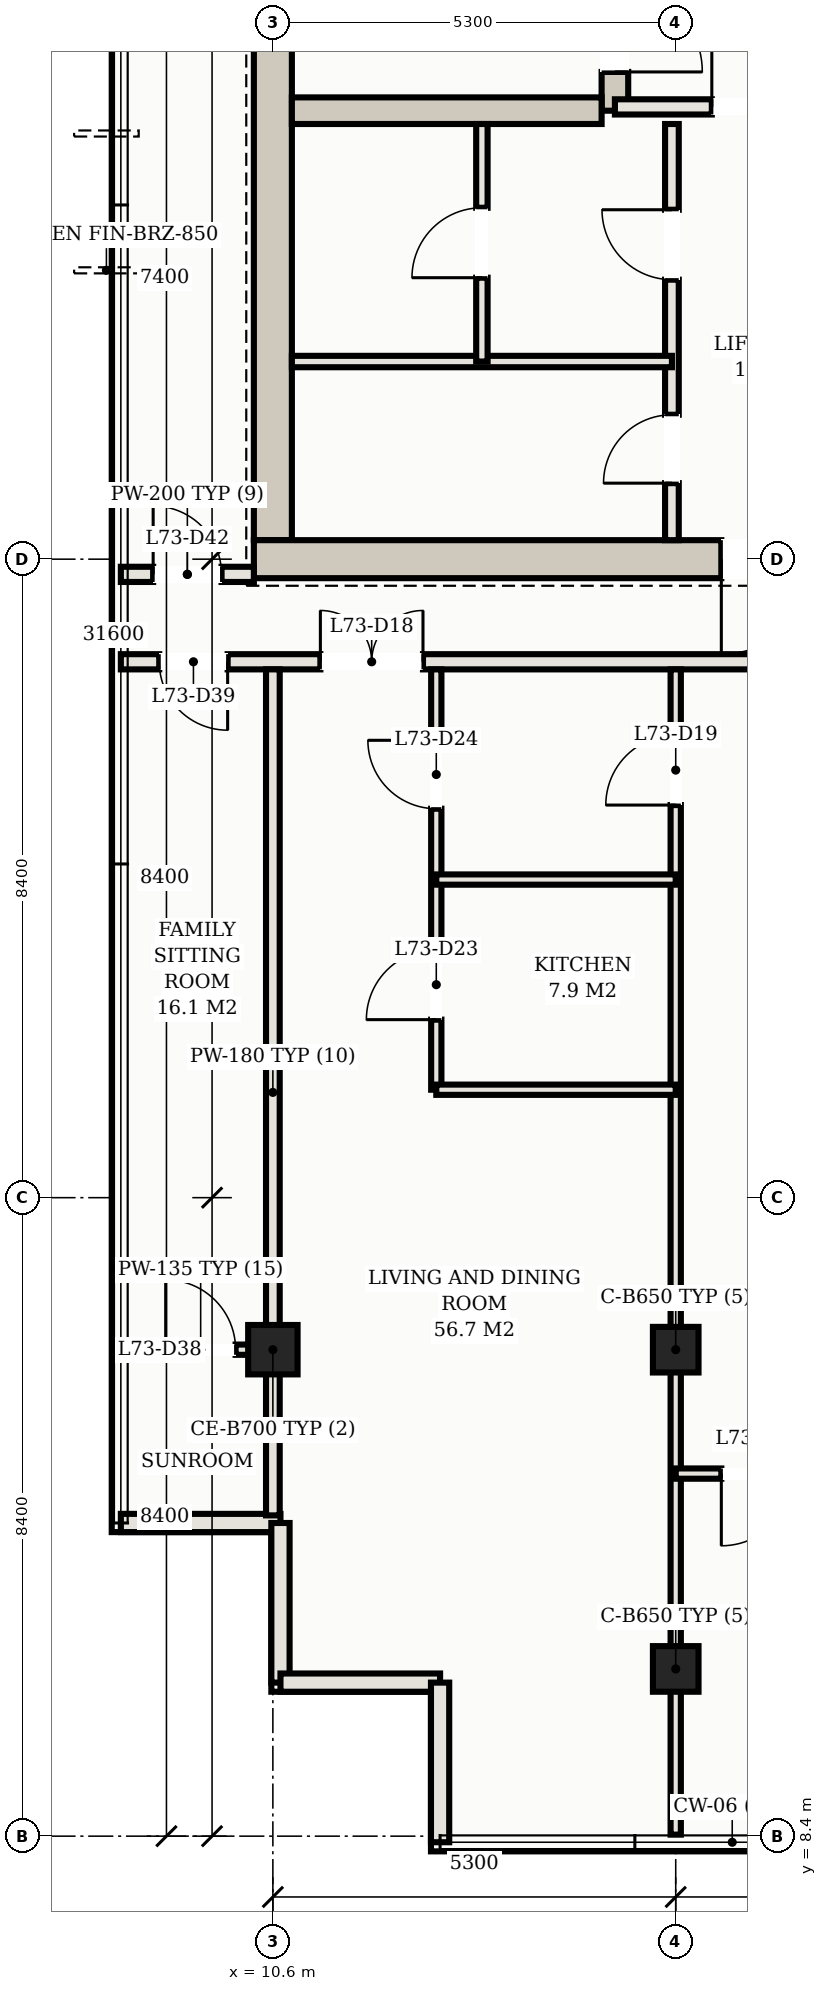
"""IFC4 building model, lengths in metres.
Left out: names, types, materials, properties, quantities, classifications, styles, units other than length and angle.
Written with IfcOpenShell. Run it as: python <this file> out.ifc"""

import sys

from ifc_helpers import new_model, si_unit, direction, frame, frame_2d, origin, origin_2d, place, context, subcontext, project, spatial, rectangle, hollow_rectangle, extrude, element, fill, save


model = new_model("IFC4")
c1 = context("Model", 3, precision=1e-05, world=origin(), true_north=direction((0.0, 1.0)))
c2 = subcontext(c1, "Body", "Model", "MODEL_VIEW")
j1 = project(units=[si_unit("LENGTHUNIT", "METRE"), si_unit("PLANEANGLEUNIT", "RADIAN")], contexts=[c1])
p1 = place(None, origin())
s1 = spatial("IfcSite", under=j1, at=p1, CompositionType="ELEMENT")
p2 = place(p1, origin())
s2 = spatial("IfcBuilding", under=s1, at=p2, CompositionType="ELEMENT")
p3 = place(p2, frame((0.0, 0.0, 262.7)))
s3 = spatial("IfcBuildingStorey", under=s2, at=p3, CompositionType="ELEMENT", Elevation=262.7)
p4 = place(p3, frame((10.6, 25.45, 0.0), z_axis=(0.0, 0.0, 1.0), x_axis=(0.0, 1.0, 0.0)))
e1 = element("IfcWall", 1, at=p4, inside=s3, PredefinedType="SHEAR", context=c2, shape_type="SweptSolid", body=[
    extrude(rectangle(XDim=14.3, YDim=0.5, at=frame_2d((7.15, 0.0))), origin(), (0.0, 0.0, 1.0), 3.04),
])
p5 = place(p3, frame((10.35, 25.2, 0.0), z_axis=(0.0, 0.0, 1.0), x_axis=(1.0, 0.0, 0.0)))
e2 = element("IfcWall", 2, at=p5, inside=s3, PredefinedType="SHEAR", context=c2, shape_type="SweptSolid", body=[
    extrude(rectangle(XDim=8.05, YDim=0.5, at=frame_2d((4.025, 0.0))), origin(), (0.0, 0.0, 1.0), 3.04),
])
p6 = place(p5, frame((6.15, 0.0, 0.0)))
e3 = element("IfcOpeningElement", 3, at=p6, cuts=e2, PredefinedType="OPENING", context=c2, shape_type="SweptSolid", body=[
    extrude(rectangle(XDim=1.25, YDim=2.2, at=frame_2d((0.625, 1.1))), frame((0.0, 0.26, 0.0), z_axis=(0.0, -1.0, 0.0), x_axis=(1.0, 0.0, 0.0)), (0.0, 0.0, 1.0), 0.52),
])
p7 = place(p3, frame((15.1, 31.1, 0.0), z_axis=(0.0, 0.0, 1.0), x_axis=(0.0, 1.0, 0.0)))
e4 = element("IfcWall", 4, at=p7, inside=s3, PredefinedType="SHEAR", context=c2, shape_type="SweptSolid", body=[
    extrude(rectangle(XDim=8.65, YDim=0.35, at=frame_2d((4.325, 0.0))), origin(), (0.0, 0.0, 1.0), 3.04),
])
p8 = place(p7, frame((0.51, 0.0, 0.0)))
e5 = element("IfcOpeningElement", 5, at=p8, cuts=e4, PredefinedType="OPENING", context=c2, shape_type="SweptSolid", body=[
    extrude(rectangle(XDim=1.15, YDim=2.2, at=frame_2d((0.575, 1.1))), frame((0.0, 0.185, 0.0), z_axis=(0.0, -1.0, 0.0), x_axis=(1.0, 0.0, 0.0)), (0.0, 0.0, 1.0), 0.37),
])
p9 = place(p3, frame((10.85, 31.1, 0.0), z_axis=(0.0, 0.0, 1.0), x_axis=(1.0, 0.0, 0.0)))
e6 = element("IfcWall", 6, at=p9, inside=s3, PredefinedType="SHEAR", context=c2, shape_type="SweptSolid", body=[
    extrude(rectangle(XDim=4.075, YDim=0.35, at=frame_2d((2.038, 0.0))), origin(), (0.0, 0.0, 1.0), 3.04),
])
p10 = place(p3, frame((15.9, 14.8, 0.0), z_axis=(0.0, 0.0, 1.0), x_axis=(1.0, 0.0, 0.0)))
e7 = element("IfcColumn", 7, at=p10, inside=s3, PredefinedType="COLUMN", context=c2, shape_type="SweptSolid", body=[
    extrude(hollow_rectangle(XDim=0.6, YDim=0.6, WallThickness=0.022, at=origin_2d()), origin(), (0.0, 0.0, 1.0), 3.3),
])
p11 = place(p3, frame((15.9, 10.6, 0.0), z_axis=(0.0, 0.0, 1.0), x_axis=(1.0, 0.0, 0.0)))
e8 = element("IfcColumn", 8, at=p11, inside=s3, PredefinedType="COLUMN", context=c2, shape_type="SweptSolid", body=[
    extrude(hollow_rectangle(XDim=0.6, YDim=0.6, WallThickness=0.022, at=origin_2d()), origin(), (0.0, 0.0, 1.0), 3.264),
])
p12 = place(p3, frame((10.6, 14.8, 0.0), z_axis=(0.0, 0.0, 1.0), x_axis=(1.0, 0.0, 0.0)))
e9 = element("IfcColumn", 9, at=p12, inside=s3, PredefinedType="COLUMN", context=c2, shape_type="SweptSolid", body=[
    extrude(hollow_rectangle(XDim=0.65, YDim=0.65, WallThickness=0.022, at=origin_2d()), origin(), (0.0, 0.0, 1.0), 3.3),
])
p13 = place(p3, frame((8.6, 12.52, 0.0), z_axis=(0.0, 0.0, 1.0), x_axis=(1.0, 0.0, 0.0)))
e10 = element("IfcWall", 10, at=p13, inside=s3, PredefinedType="SOLIDWALL", context=c2, shape_type="SweptSolid", body=[
    extrude(rectangle(XDim=2.1, YDim=0.24, at=frame_2d((1.05, 0.0))), origin(), (0.0, 0.0, 1.0), 3.04),
])
for number, where, z_axis, x_axis in (
    (11, (10.7, 12.52, 0.0), (0.0, 0.0, 1.0), (0.0, -1.0, 0.0)),
    (12, (10.7, 10.42, 0.0), (0.0, 0.0, 1.0), (1.0, 0.0, 0.0)),
):
    element("IfcWall", number, at=place(p3, frame(where, z_axis=z_axis, x_axis=x_axis)), inside=s3, PredefinedType="SOLIDWALL", context=c2, shape_type="SweptSolid", body=[
        extrude(rectangle(XDim=2.1, YDim=0.24, at=frame_2d((1.05, 0.0))), origin(), (0.0, 0.0, 1.0), 3.04),
    ])
p14 = place(p3, frame((12.8, 10.42, 0.0), z_axis=(0.0, 0.0, 1.0), x_axis=(0.0, -1.0, 0.0)))
e13 = element("IfcWall", 13, at=p14, inside=s3, PredefinedType="SOLIDWALL", context=c2, shape_type="SweptSolid", body=[
    extrude(rectangle(XDim=2.1, YDim=0.24, at=frame_2d((1.05, 0.0))), origin(), (0.0, 0.0, 1.0), 3.04),
])
p15 = place(p3, frame((15.1, 31.15, 0.0), z_axis=(0.0, 0.0, 1.0), x_axis=(1.0, 0.0, 0.0)))
e14 = element("IfcWall", 14, at=p15, inside=s3, PredefinedType="PARTITIONING", context=c2, shape_type="SweptSolid", body=[
    extrude(rectangle(XDim=3.25, YDim=0.2, at=frame_2d((1.625, 0.0))), origin(), (0.0, 0.0, 1.0), 2.38),
])
p16 = place(p15, frame((1.275, 0.0, 0.0)))
e15 = element("IfcOpeningElement", 15, at=p16, cuts=e14, PredefinedType="OPENING", context=c2, shape_type="SweptSolid", body=[
    extrude(rectangle(XDim=1.25, YDim=2.2, at=frame_2d((0.625, 1.1))), frame((0.0, 0.11, 0.0), z_axis=(0.0, -1.0, 0.0), x_axis=(1.0, 0.0, 0.0)), (0.0, 0.0, 1.0), 0.22),
])
p17 = place(p3, frame((15.85, 25.45, 0.0), z_axis=(0.0, 0.0, 1.0), x_axis=(0.0, 1.0, 0.0)))
e16 = element("IfcWall", 16, at=p17, inside=s3, PredefinedType="PARTITIONING", context=c2, shape_type="SweptSolid", body=[
    extrude(rectangle(XDim=5.475, YDim=0.18, at=frame_2d((2.738, 0.0))), origin(), (0.0, 0.0, 1.0), 2.38),
])
p18 = place(p17, frame((0.75, 0.0, 0.0)))
e17 = element("IfcOpeningElement", 17, at=p18, cuts=e16, PredefinedType="OPENING", context=c2, shape_type="SweptSolid", body=[
    extrude(rectangle(XDim=0.9, YDim=2.15, at=frame_2d((0.45, 1.075))), frame((0.0, 0.1, 0.0), z_axis=(0.0, -1.0, 0.0), x_axis=(1.0, 0.0, 0.0)), (0.0, 0.0, 1.0), 0.2),
])
p19 = place(p17, frame((3.427, 0.0, 0.0)))
e18 = element("IfcOpeningElement", 18, at=p19, cuts=e16, PredefinedType="OPENING", context=c2, shape_type="SweptSolid", body=[
    extrude(rectangle(XDim=0.92, YDim=2.15, at=frame_2d((0.46, 1.075))), frame((0.0, 0.1, 0.0), z_axis=(0.0, -1.0, 0.0), x_axis=(1.0, 0.0, 0.0)), (0.0, 0.0, 1.0), 0.2),
])
p20 = place(p3, frame((10.85, 27.8, 0.0), z_axis=(0.0, 0.0, 1.0), x_axis=(1.0, 0.0, 0.0)))
e19 = element("IfcWall", 19, at=p20, inside=s3, PredefinedType="PARTITIONING", context=c2, shape_type="SweptSolid", body=[
    extrude(rectangle(XDim=5.0, YDim=0.15, at=frame_2d((2.5, 0.0))), origin(), (0.0, 0.0, 1.0), 2.38),
])
p21 = place(p3, frame((13.35, 27.8, 0.0), z_axis=(0.0, 0.0, 1.0), x_axis=(0.0, 1.0, 0.0)))
e20 = element("IfcWall", 20, at=p21, inside=s3, PredefinedType="PARTITIONING", context=c2, shape_type="SweptSolid", body=[
    extrude(rectangle(XDim=3.125, YDim=0.15, at=frame_2d((1.562, 0.0))), origin(), (0.0, 0.0, 1.0), 2.38),
])
p22 = place(p21, frame((1.103, 0.0, 0.0)))
e21 = element("IfcOpeningElement", 21, at=p22, cuts=e20, PredefinedType="OPENING", context=c2, shape_type="SweptSolid", body=[
    extrude(rectangle(XDim=0.92, YDim=2.15, at=frame_2d((0.46, 1.075))), frame((0.0, 0.085, 0.0), z_axis=(0.0, -1.0, 0.0), x_axis=(1.0, 0.0, 0.0)), (0.0, 0.0, 1.0), 0.17),
])
p23 = place(p3, frame((8.6, 23.85, 0.0), z_axis=(0.0, 0.0, 1.0), x_axis=(1.0, 0.0, 0.0)))
e22 = element("IfcWall", 22, at=p23, inside=s3, PredefinedType="PARTITIONING", context=c2, shape_type="SweptSolid", body=[
    extrude(rectangle(XDim=35.8, YDim=0.2, at=frame_2d((17.9, 0.0))), origin(), (0.0, 0.0, 1.0), 2.38),
])
p24 = place(p23, frame((2.625, 0.0, 0.0)))
e23 = element("IfcOpeningElement", 23, at=p24, cuts=e22, PredefinedType="OPENING", context=c2, shape_type="SweptSolid", body=[
    extrude(rectangle(XDim=1.35, YDim=2.26, at=frame_2d((0.675, 1.13))), frame((0.0, 0.11, 0.0), z_axis=(0.0, -1.0, 0.0), x_axis=(1.0, 0.0, 0.0)), (0.0, 0.0, 1.0), 0.22),
])
p25 = place(p23, frame((0.505, 0.0, 0.0)))
e24 = element("IfcOpeningElement", 24, at=p25, cuts=e22, PredefinedType="OPENING", context=c2, shape_type="SweptSolid", body=[
    extrude(rectangle(XDim=0.9, YDim=2.15, at=frame_2d((0.45, 1.075))), frame((0.0, 0.11, 0.0), z_axis=(0.0, -1.0, 0.0), x_axis=(1.0, 0.0, 0.0)), (0.0, 0.0, 1.0), 0.22),
])
p26 = place(p23, frame((34.395, 0.0, 0.0)))
e25 = element("IfcOpeningElement", 25, at=p26, cuts=e22, PredefinedType="OPENING", context=c2, shape_type="SweptSolid", body=[
    extrude(rectangle(XDim=0.9, YDim=2.15, at=frame_2d((0.45, 1.075))), frame((0.0, 0.11, 0.0), z_axis=(0.0, -1.0, 0.0), x_axis=(1.0, 0.0, 0.0)), (0.0, 0.0, 1.0), 0.22),
])
p27 = place(p3, frame((8.6, 25.0, 0.0), z_axis=(0.0, 0.0, 1.0), x_axis=(1.0, 0.0, 0.0)))
e26 = element("IfcWall", 26, at=p27, inside=s3, PredefinedType="PARTITIONING", context=c2, shape_type="SweptSolid", body=[
    extrude(rectangle(XDim=1.75, YDim=0.2, at=frame_2d((0.875, 0.0))), origin(), (0.0, 0.0, 1.0), 2.38),
])
p28 = place(p27, frame((0.425, 0.0, 0.0)))
e27 = element("IfcOpeningElement", 27, at=p28, cuts=e26, PredefinedType="OPENING", context=c2, shape_type="SweptSolid", body=[
    extrude(rectangle(XDim=0.9, YDim=2.15, at=frame_2d((0.45, 1.075))), frame((0.0, 0.11, 0.0), z_axis=(0.0, -1.0, 0.0), x_axis=(1.0, 0.0, 0.0)), (0.0, 0.0, 1.0), 0.22),
])
p29 = place(p3, frame((10.6, 12.62, 0.0), z_axis=(0.0, 0.0, 1.0), x_axis=(0.0, 1.0, 0.0)))
e28 = element("IfcWall", 28, at=p29, inside=s3, PredefinedType="PARTITIONING", context=c2, shape_type="SweptSolid", body=[
    extrude(rectangle(XDim=11.13, YDim=0.18, at=frame_2d((5.565, 0.0))), origin(), (0.0, 0.0, 1.0), 2.38),
])
p30 = place(p3, frame((15.9, 8.42, 0.0), z_axis=(0.0, 0.0, 1.0), x_axis=(0.0, 1.0, 0.0)))
e29 = element("IfcWall", 29, at=p30, inside=s3, PredefinedType="PARTITIONING", context=c2, shape_type="SweptSolid", body=[
    extrude(rectangle(XDim=15.33, YDim=0.135, at=frame_2d((7.665, 0.0))), origin(), (0.0, 0.0, 1.0), 2.38),
])
p31 = place(p30, frame((13.545, 0.0, 0.0)))
e30 = element("IfcOpeningElement", 30, at=p31, cuts=e29, PredefinedType="OPENING", context=c2, shape_type="SweptSolid", body=[
    extrude(rectangle(XDim=0.92, YDim=2.15, at=frame_2d((0.46, 1.075))), frame((0.0, 0.078, 0.0), z_axis=(0.0, -1.0, 0.0), x_axis=(1.0, 0.0, 0.0)), (0.0, 0.0, 1.0), 0.155),
])
p32 = place(p3, frame((12.75, 18.22, 0.0), z_axis=(0.0, 0.0, 1.0), x_axis=(0.0, 1.0, 0.0)))
e31 = element("IfcWall", 31, at=p32, inside=s3, PredefinedType="PARTITIONING", context=c2, shape_type="SweptSolid", body=[
    extrude(rectangle(XDim=5.53, YDim=0.135, at=frame_2d((2.765, 0.0))), origin(), (0.0, 0.0, 1.0), 2.38),
])
p33 = place(p32, frame((0.922, 0.0, 0.0)))
e32 = element("IfcOpeningElement", 32, at=p33, cuts=e31, PredefinedType="OPENING", context=c2, shape_type="SweptSolid", body=[
    extrude(rectangle(XDim=0.92, YDim=2.15, at=frame_2d((0.46, 1.075))), frame((0.0, 0.078, 0.0), z_axis=(0.0, -1.0, 0.0), x_axis=(1.0, 0.0, 0.0)), (0.0, 0.0, 1.0), 0.155),
])
p34 = place(p32, frame((3.697, 0.0, 0.0)))
e33 = element("IfcOpeningElement", 33, at=p34, cuts=e31, PredefinedType="OPENING", context=c2, shape_type="SweptSolid", body=[
    extrude(rectangle(XDim=0.9, YDim=2.15, at=frame_2d((0.45, 1.075))), frame((0.0, 0.078, 0.0), z_axis=(0.0, -1.0, 0.0), x_axis=(1.0, 0.0, 0.0)), (0.0, 0.0, 1.0), 0.155),
])
for number, where, z_axis, x_axis in (
    (34, (12.75, 18.22, 0.0), (0.0, 0.0, 1.0), (1.0, 0.0, 0.0)),
    (35, (12.75, 20.985, 0.0), (0.0, 0.0, 1.0), (1.0, 0.0, 0.0)),
):
    element("IfcWall", number, at=place(p3, frame(where, z_axis=z_axis, x_axis=x_axis)), inside=s3, PredefinedType="PARTITIONING", context=c2, shape_type="SweptSolid", body=[
        extrude(rectangle(XDim=3.15, YDim=0.135, at=frame_2d((1.575, 0.0))), origin(), (0.0, 0.0, 1.0), 2.38),
    ])
p35 = place(p3, frame((15.9, 13.17, 0.0), z_axis=(0.0, 0.0, 1.0), x_axis=(1.0, 0.0, 0.0)))
e36 = element("IfcWall", 36, at=p35, inside=s3, PredefinedType="PARTITIONING", context=c2, shape_type="SweptSolid", body=[
    extrude(rectangle(XDim=5.3, YDim=0.135, at=frame_2d((2.65, 0.0))), origin(), (0.0, 0.0, 1.0), 2.38),
])
p36 = place(p35, frame((0.6, 0.0, 0.0)))
e37 = element("IfcOpeningElement", 37, at=p36, cuts=e36, PredefinedType="OPENING", context=c2, shape_type="SweptSolid", body=[
    extrude(rectangle(XDim=0.95, YDim=2.15, at=frame_2d((0.475, 1.075))), frame((0.0, 0.078, 0.0), z_axis=(0.0, -1.0, 0.0), x_axis=(1.0, 0.0, 0.0)), (0.0, 0.0, 1.0), 0.155),
])
p37 = place(p35, frame((3.275, 0.0, 0.0)))
e38 = element("IfcOpeningElement", 38, at=p37, cuts=e36, PredefinedType="OPENING", context=c2, shape_type="SweptSolid", body=[
    extrude(rectangle(XDim=0.9, YDim=2.15, at=frame_2d((0.45, 1.075))), frame((0.0, 0.078, 0.0), z_axis=(0.0, -1.0, 0.0), x_axis=(1.0, 0.0, 0.0)), (0.0, 0.0, 1.0), 0.155),
])
p38 = place(p3, frame((8.7, 14.8, 0.0), z_axis=(0.0, 0.0, 1.0), x_axis=(1.0, 0.0, 0.0)))
e39 = element("IfcWall", 39, at=p38, inside=s3, PredefinedType="PARTITIONING", context=c2, shape_type="SweptSolid", body=[
    extrude(rectangle(XDim=1.9, YDim=0.135, at=frame_2d((0.95, 0.0))), origin(), (0.0, 0.0, 1.0), 2.38),
])
p39 = place(p38, frame((0.49, 0.0, 0.0)))
e40 = element("IfcOpeningElement", 40, at=p39, cuts=e39, PredefinedType="OPENING", context=c2, shape_type="SweptSolid", body=[
    extrude(rectangle(XDim=0.92, YDim=2.15, at=frame_2d((0.46, 1.075))), frame((0.0, 0.078, 0.0), z_axis=(0.0, -1.0, 0.0), x_axis=(1.0, 0.0, 0.0)), (0.0, 0.0, 1.0), 0.155),
])
p40 = place(p6, frame((1.25, 0.0, 0.0), z_axis=(0.0, 0.0, 1.0), x_axis=(-1.0, 0.0, 0.0)))
e41 = element("IfcDoor", 41, at=p40, inside=s3, OperationType="SINGLE_SWING_RIGHT", PredefinedType="DOOR", context=c2, shape_type="SweptSolid", body=[
    extrude(rectangle(XDim=1.25, YDim=2.2, at=frame_2d((0.625, 1.1))), frame((0.0, 0.025, 0.0), z_axis=(0.0, -1.0, 0.0), x_axis=(1.0, 0.0, 0.0)), (0.0, 0.0, 1.0), 0.05),
])
fill(e3, e41)
p41 = place(p16, origin())
e42 = element("IfcDoor", 42, at=p41, inside=s3, OperationType="SINGLE_SWING_LEFT", PredefinedType="DOOR", context=c2, shape_type="SweptSolid", body=[
    extrude(rectangle(XDim=1.25, YDim=2.2, at=frame_2d((0.625, 1.1))), frame((0.0, 0.025, 0.0), z_axis=(0.0, -1.0, 0.0), x_axis=(1.0, 0.0, 0.0)), (0.0, 0.0, 1.0), 0.05),
])
fill(e15, e42)
p42 = place(p8, frame((1.15, 0.0, 0.0), z_axis=(0.0, 0.0, 1.0), x_axis=(-1.0, 0.0, 0.0)))
e43 = element("IfcDoor", 43, at=p42, inside=s3, OperationType="SINGLE_SWING_RIGHT", PredefinedType="DOOR", context=c2, shape_type="SweptSolid", body=[
    extrude(rectangle(XDim=1.15, YDim=2.2, at=frame_2d((0.575, 1.1))), frame((0.0, 0.025, 0.0), z_axis=(0.0, -1.0, 0.0), x_axis=(1.0, 0.0, 0.0)), (0.0, 0.0, 1.0), 0.05),
])
fill(e5, e43)
p43 = place(p18, origin())
e44 = element("IfcDoor", 44, at=p43, inside=s3, OperationType="SINGLE_SWING_LEFT", PredefinedType="DOOR", context=c2, shape_type="SweptSolid", body=[
    extrude(rectangle(XDim=0.9, YDim=2.15, at=frame_2d((0.45, 1.075))), frame((0.0, 0.025, 0.0), z_axis=(0.0, -1.0, 0.0), x_axis=(1.0, 0.0, 0.0)), (0.0, 0.0, 1.0), 0.05),
])
fill(e17, e44)
p44 = place(p19, origin())
e45 = element("IfcDoor", 45, at=p44, inside=s3, OperationType="SINGLE_SWING_RIGHT", PredefinedType="DOOR", context=c2, shape_type="SweptSolid", body=[
    extrude(rectangle(XDim=0.92, YDim=2.15, at=frame_2d((0.46, 1.075))), frame((0.0, 0.025, 0.0), z_axis=(0.0, -1.0, 0.0), x_axis=(1.0, 0.0, 0.0)), (0.0, 0.0, 1.0), 0.05),
])
fill(e18, e45)
p45 = place(p22, origin())
e46 = element("IfcDoor", 46, at=p45, inside=s3, OperationType="SINGLE_SWING_LEFT", PredefinedType="DOOR", context=c2, shape_type="SweptSolid", body=[
    extrude(rectangle(XDim=0.92, YDim=2.15, at=frame_2d((0.46, 1.075))), frame((0.0, 0.025, 0.0), z_axis=(0.0, -1.0, 0.0), x_axis=(1.0, 0.0, 0.0)), (0.0, 0.0, 1.0), 0.05),
])
fill(e21, e46)
p46 = place(p24, origin())
e47 = element("IfcDoor", 47, at=p46, inside=s3, OperationType="DOUBLE_DOOR_SINGLE_SWING", PredefinedType="DOOR", context=c2, shape_type="SweptSolid", body=[
    extrude(rectangle(XDim=1.35, YDim=2.26, at=frame_2d((0.675, 1.13))), frame((0.0, 0.025, 0.0), z_axis=(0.0, -1.0, 0.0), x_axis=(1.0, 0.0, 0.0)), (0.0, 0.0, 1.0), 0.05),
])
fill(e23, e47)
p47 = place(p31, origin())
e48 = element("IfcDoor", 48, at=p47, inside=s3, OperationType="SINGLE_SWING_LEFT", PredefinedType="DOOR", context=c2, shape_type="SweptSolid", body=[
    extrude(rectangle(XDim=0.92, YDim=2.15, at=frame_2d((0.46, 1.075))), frame((0.0, 0.025, 0.0), z_axis=(0.0, -1.0, 0.0), x_axis=(1.0, 0.0, 0.0)), (0.0, 0.0, 1.0), 0.05),
])
fill(e30, e48)
p48 = place(p33, origin())
e49 = element("IfcDoor", 49, at=p48, inside=s3, OperationType="SINGLE_SWING_LEFT", PredefinedType="DOOR", context=c2, shape_type="SweptSolid", body=[
    extrude(rectangle(XDim=0.92, YDim=2.15, at=frame_2d((0.46, 1.075))), frame((0.0, 0.025, 0.0), z_axis=(0.0, -1.0, 0.0), x_axis=(1.0, 0.0, 0.0)), (0.0, 0.0, 1.0), 0.05),
])
fill(e32, e49)
p49 = place(p34, origin())
e50 = element("IfcDoor", 50, at=p49, inside=s3, OperationType="SINGLE_SWING_RIGHT", PredefinedType="DOOR", context=c2, shape_type="SweptSolid", body=[
    extrude(rectangle(XDim=0.9, YDim=2.15, at=frame_2d((0.45, 1.075))), frame((0.0, 0.025, 0.0), z_axis=(0.0, -1.0, 0.0), x_axis=(1.0, 0.0, 0.0)), (0.0, 0.0, 1.0), 0.05),
])
fill(e33, e50)
p50 = place(p36, frame((0.95, 0.0, 0.0), z_axis=(0.0, 0.0, 1.0), x_axis=(-1.0, 0.0, 0.0)))
e51 = element("IfcDoor", 51, at=p50, inside=s3, OperationType="SINGLE_SWING_RIGHT", PredefinedType="DOOR", context=c2, shape_type="SweptSolid", body=[
    extrude(rectangle(XDim=0.95, YDim=2.15, at=frame_2d((0.475, 1.075))), frame((0.0, 0.025, 0.0), z_axis=(0.0, -1.0, 0.0), x_axis=(1.0, 0.0, 0.0)), (0.0, 0.0, 1.0), 0.05),
])
fill(e37, e51)
p51 = place(p39, origin())
e52 = element("IfcDoor", 52, at=p51, inside=s3, OperationType="SINGLE_SWING_LEFT", PredefinedType="DOOR", context=c2, shape_type="SweptSolid", body=[
    extrude(rectangle(XDim=0.92, YDim=2.15, at=frame_2d((0.46, 1.075))), frame((0.0, 0.025, 0.0), z_axis=(0.0, -1.0, 0.0), x_axis=(1.0, 0.0, 0.0)), (0.0, 0.0, 1.0), 0.05),
])
fill(e40, e52)
p52 = place(p25, frame((0.9, 0.0, 0.0), z_axis=(0.0, 0.0, 1.0), x_axis=(-1.0, 0.0, 0.0)))
e53 = element("IfcDoor", 53, at=p52, inside=s3, OperationType="SINGLE_SWING_LEFT", PredefinedType="DOOR", context=c2, shape_type="SweptSolid", body=[
    extrude(rectangle(XDim=0.9, YDim=2.15, at=frame_2d((0.45, 1.075))), frame((0.0, 0.025, 0.0), z_axis=(0.0, -1.0, 0.0), x_axis=(1.0, 0.0, 0.0)), (0.0, 0.0, 1.0), 0.05),
])
fill(e24, e53)
p53 = place(p28, origin())
e54 = element("IfcDoor", 54, at=p53, inside=s3, OperationType="SINGLE_SWING_LEFT", PredefinedType="DOOR", context=c2, shape_type="SweptSolid", body=[
    extrude(rectangle(XDim=0.9, YDim=2.15, at=frame_2d((0.45, 1.075))), frame((0.0, 0.025, 0.0), z_axis=(0.0, -1.0, 0.0), x_axis=(1.0, 0.0, 0.0)), (0.0, 0.0, 1.0), 0.05),
])
fill(e27, e54)
save(model, sys.argv[1])
